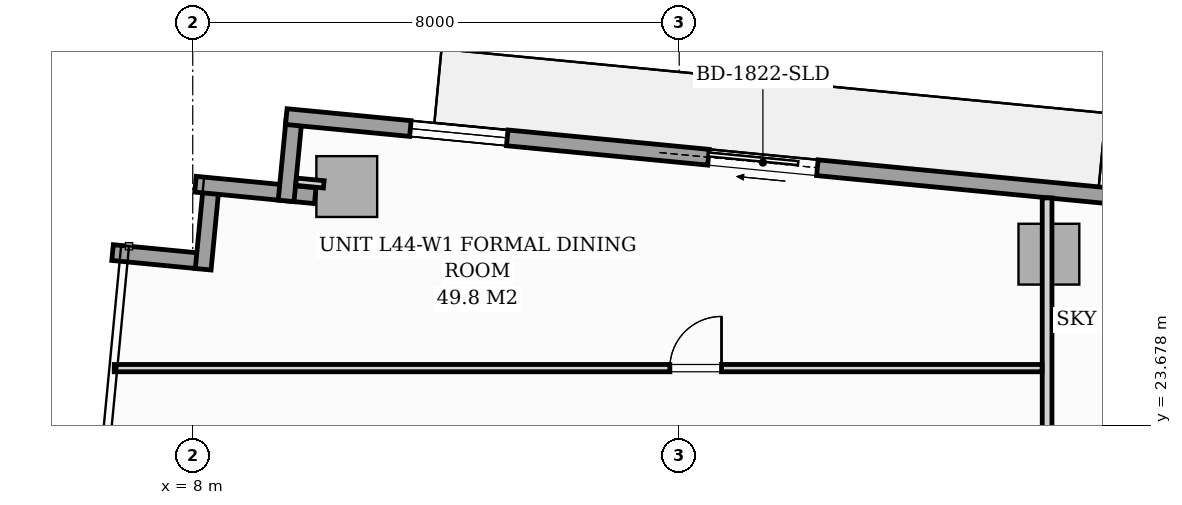
"""IFC4 building model, lengths in metres.
Left out: names, types, materials, properties, quantities, classifications, styles, units other than length and angle.
Written with IfcOpenShell. Run it as: python <this file> out.ifc"""

import sys

from ifc_helpers import new_model, si_unit, direction, frame, frame_2d, origin, origin_2d, place, context, subcontext, project, spatial, rectangle, extrude, source, transform, mapped, element, fill, save


model = new_model("IFC4")
c1 = context("Model", 3, precision=1e-05, world=origin(), true_north=direction((0.0, 1.0)))
c2 = subcontext(c1, "Body", "Model", "MODEL_VIEW")
j1 = project(units=[si_unit("LENGTHUNIT", "METRE"), si_unit("PLANEANGLEUNIT", "RADIAN")], contexts=[c1])
p1 = place(None, origin())
s1 = spatial("IfcSite", under=j1, at=p1, CompositionType="ELEMENT")
p2 = place(p1, origin())
s2 = spatial("IfcBuilding", under=s1, at=p2, CompositionType="ELEMENT")
p3 = place(p2, frame((0.0, 0.0, 153.4)))
s3 = spatial("IfcBuildingStorey", under=s2, at=p3, CompositionType="ELEMENT", Elevation=153.4)
m1 = source(origin(), c2, "Body", "SweptSolid", [
    extrude(rectangle(XDim=1.0, YDim=1.0, at=origin_2d()), origin(), (0.0, 0.0, 1.0), 3.196),
])
for number, where, z_axis, x_axis in (
    (1, (10.533, 27.604, 0.002), (0.0, 0.0, 1.0), (0.995, -0.096, 0.0)),
    (2, (22.08, 26.492, 0.002), (0.0, 0.0, 1.0), (0.995, -0.096, 0.0)),
):
    element("IfcColumn", number, at=place(p3, frame(where, z_axis=z_axis, x_axis=x_axis)), inside=s3, PredefinedType="COLUMN", context=c2, shape_type="MappedRepresentation", body=[
        mapped(m1, transform((0.0, 0.0, 0.0), scale=1.0)),
    ])
p4 = place(p3, frame((6.681, 26.518, 0.0), z_axis=(0.0, 0.0, 1.0), x_axis=(0.995389446633, -0.095915846097, 0.0)))
e3 = element("IfcWall", 3, at=p4, inside=s3, PredefinedType="STANDARD", context=c2, shape_type="SweptSolid", body=[
    extrude(rectangle(XDim=1.395, YDim=0.26, at=frame_2d((0.697, 0.0))), origin(), (0.0, 0.0, 1.0), 2.94),
])
p5 = place(p3, frame((8.172, 26.244, 0.0), z_axis=(0.0, 0.0, 1.0), x_axis=(0.095725744959, 0.99540774648, 0.0)))
e4 = element("IfcWall", 4, at=p5, inside=s3, PredefinedType="STANDARD", context=c2, shape_type="SweptSolid", body=[
    extrude(rectangle(XDim=1.395, YDim=0.26, at=frame_2d((0.698, 0.0))), origin(), (0.0, 0.0, 1.0), 2.94),
])
p6 = place(p3, frame((8.045, 27.643, 0.0), z_axis=(0.0, 0.0, 1.0), x_axis=(0.995391147587, -0.095898192396, 0.0)))
e5 = element("IfcWall", 5, at=p6, inside=s3, PredefinedType="STANDARD", context=c2, shape_type="SweptSolid", body=[
    extrude(rectangle(XDim=1.978, YDim=0.26, at=frame_2d((0.989, 0.0))), origin(), (0.0, 0.0, 1.0), 2.94),
])
p7 = place(p3, frame((9.536, 27.368, 0.0), z_axis=(0.0, 0.0, 1.0), x_axis=(0.095915846097, 0.995389446633, 0.0)))
e6 = element("IfcWall", 6, at=p7, inside=s3, PredefinedType="STANDARD", context=c2, shape_type="SweptSolid", body=[
    extrude(rectangle(XDim=1.395, YDim=0.26, at=frame_2d((0.697, 0.0))), origin(), (0.0, 0.0, 1.0), 2.94),
])
p8 = place(p3, frame((9.539, 28.754, 0.0), z_axis=(0.0, 0.0, 1.0), x_axis=(0.995397345886, -0.09583383433, 0.0)))
e7 = element("IfcWall", 7, at=p8, inside=s3, PredefinedType="STANDARD", context=c2, shape_type="SweptSolid", body=[
    extrude(rectangle(XDim=17.01, YDim=0.26, at=frame_2d((8.505, 0.0))), origin(), (0.0, 0.0, 1.0), 2.94),
])
p9 = place(p8, frame((6.974, 0.0, 0.0)))
e8 = element("IfcOpeningElement", 8, at=p9, cuts=e7, PredefinedType="OPENING", context=c2, shape_type="SweptSolid", body=[
    extrude(rectangle(XDim=1.8, YDim=2.06, at=frame_2d((0.9, 1.03))), frame((0.0, 0.14, 0.0), z_axis=(0.0, -1.0, 0.0), x_axis=(1.0, 0.0, 0.0)), (0.0, 0.0, 1.0), 0.28),
])
p10 = place(p8, frame((2.05, 0.0, 0.65)))
e9 = element("IfcOpeningElement", 9, at=p10, cuts=e7, PredefinedType="OPENING", context=c2, shape_type="SweptSolid", body=[
    extrude(rectangle(XDim=1.6, YDim=1.5, at=frame_2d((0.8, 0.75))), frame((0.0, 0.14, 0.0), z_axis=(0.0, -1.0, 0.0), x_axis=(1.0, 0.0, 0.0)), (0.0, 0.0, 1.0), 0.28),
])
p11 = place(p3, frame((22.05, 12.632, 0.0), z_axis=(0.0, 0.0, 1.0), x_axis=(0.0, 1.0, 0.0)))
e10 = element("IfcWall", 10, at=p11, inside=s3, PredefinedType="PARTITIONING", context=c2, shape_type="SweptSolid", body=[
    extrude(rectangle(XDim=14.785, YDim=0.16, at=frame_2d((7.393, 0.0))), origin(), (0.0, 0.0, 1.0), 2.94),
])
p12 = place(p11, frame((0.493, 0.0, 0.0)))
e11 = element("IfcOpeningElement", 11, at=p12, cuts=e10, PredefinedType="OPENING", context=c2, shape_type="SweptSolid", body=[
    extrude(rectangle(XDim=0.95, YDim=2.06, at=frame_2d((0.475, 1.03))), frame((0.0, 0.09, 0.0), z_axis=(0.0, -1.0, 0.0), x_axis=(1.0, 0.0, 0.0)), (0.0, 0.0, 1.0), 0.18),
])
p13 = place(p3, frame((6.709, 24.618, 0.0), z_axis=(0.0, 0.0, 1.0), x_axis=(1.0, 0.0, 0.0)))
e12 = element("IfcWall", 12, at=p13, inside=s3, PredefinedType="PARTITIONING", context=c2, shape_type="SweptSolid", body=[
    extrude(rectangle(XDim=15.259, YDim=0.12, at=frame_2d((7.629, 0.0))), origin(), (0.0, 0.0, 1.0), 2.94),
])
p14 = place(p13, frame((9.137, 0.0, 0.0)))
e13 = element("IfcOpeningElement", 13, at=p14, cuts=e12, PredefinedType="OPENING", context=c2, shape_type="SweptSolid", body=[
    extrude(rectangle(XDim=0.85, YDim=2.05, at=frame_2d((0.425, 1.025))), frame((0.0, 0.07, 0.0), z_axis=(0.0, -1.0, 0.0), x_axis=(1.0, 0.0, 0.0)), (0.0, 0.0, 1.0), 0.14),
])
p15 = place(p3, frame((10.155, 27.64, 0.0), z_axis=(0.0, 0.0, 1.0), x_axis=(-0.995435366701, 0.095438098896, 0.0)))
e14 = element("IfcWall", 14, at=p15, inside=s3, PredefinedType="PARTITIONING", context=c2, shape_type="SweptSolid", body=[
    extrude(rectangle(XDim=0.458, YDim=0.12, at=frame_2d((0.229, 0.0))), origin(), (0.0, 0.0, 1.0), 2.94),
])
m2 = source(origin(), c2, "Body", "SweptSolid", [
    extrude(rectangle(XDim=1.8, YDim=2.06, at=frame_2d((0.9, 1.03))), frame((0.0, 0.025, 0.0), z_axis=(0.0, -1.0, 0.0), x_axis=(1.0, 0.0, 0.0)), (0.0, 0.0, 1.0), 0.05),
])
p16 = place(p9, origin())
e15 = element("IfcDoor", 15, at=p16, inside=s3, OperationType="SLIDING_TO_LEFT", PredefinedType="DOOR", context=c2, shape_type="MappedRepresentation", body=[
    mapped(m2, transform((0.0, 0.0, 0.0), scale=1.0)),
])
fill(e8, e15)
m3 = source(origin(), c2, "Body", "SweptSolid", [
    extrude(rectangle(XDim=1.6, YDim=1.5, at=frame_2d((0.8, 0.75))), frame((0.0, 0.03, 0.0), z_axis=(0.0, -1.0, 0.0), x_axis=(1.0, 0.0, 0.0)), (0.0, 0.0, 1.0), 0.06),
])
p17 = place(p10, origin())
e16 = element("IfcWindow", 16, at=p17, inside=s3, PartitioningType="SINGLE_PANEL", PredefinedType="WINDOW", context=c2, shape_type="MappedRepresentation", body=[
    mapped(m3, transform((0.0, 0.0, 0.0), scale=1.0)),
])
fill(e9, e16)
m4 = source(origin(), c2, "Body", "SweptSolid", [
    extrude(rectangle(XDim=0.85, YDim=2.05, at=frame_2d((0.425, 1.025))), frame((0.0, 0.025, 0.0), z_axis=(0.0, -1.0, 0.0), x_axis=(1.0, 0.0, 0.0)), (0.0, 0.0, 1.0), 0.05),
])
p18 = place(p14, origin())
e17 = element("IfcDoor", 17, at=p18, inside=s3, OperationType="SINGLE_SWING_RIGHT", PredefinedType="DOOR", context=c2, shape_type="MappedRepresentation", body=[
    mapped(m4, transform((0.0, 0.0, 0.0), scale=1.0)),
])
fill(e13, e17)
save(model, sys.argv[1])
